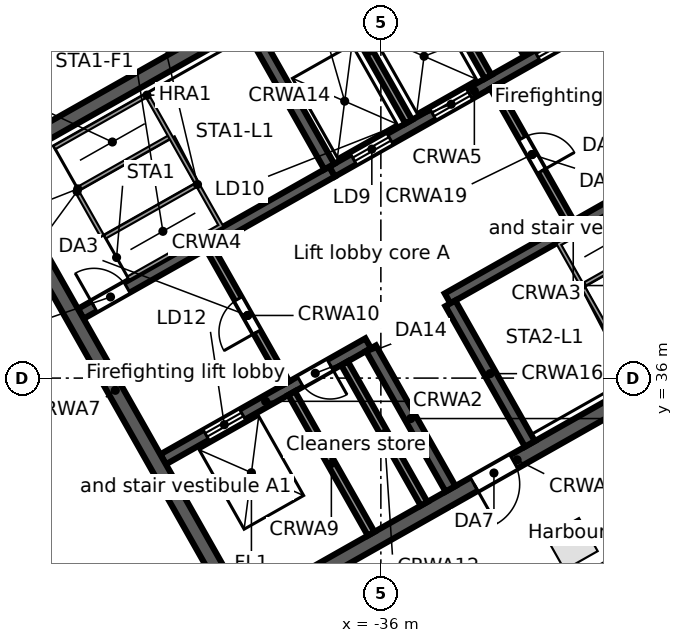
"""IFC4 building model, lengths in metres.
Left out: names, types, materials, properties, quantities, classifications, styles, units other than length and angle.
Written with IfcOpenShell. Run it as: python <this file> out.ifc"""

import sys

from ifc_helpers import new_model, si_unit, direction, frame, frame_2d, origin, origin_2d, place, context, subcontext, project, spatial, rectangle, extrude, element, fill, save


model = new_model("IFC4")
c1 = context("Model", 3, precision=1e-05, world=origin(), true_north=direction((0.0, 1.0)))
c2 = subcontext(c1, "Body", "Model", "MODEL_VIEW")
j1 = project(units=[si_unit("LENGTHUNIT", "METRE"), si_unit("PLANEANGLEUNIT", "RADIAN")], contexts=[c1])
p1 = place(None, origin())
s1 = spatial("IfcSite", under=j1, at=p1, CompositionType="ELEMENT")
p2 = place(p1, origin())
s2 = spatial("IfcBuilding", under=s1, at=p2, CompositionType="ELEMENT")
p3 = place(p2, frame((0.0, 0.0, 335.5)))
s3 = spatial("IfcBuildingStorey", under=s2, at=p3, CompositionType="ELEMENT", Elevation=335.5)
p4 = place(p3, frame((-30.976, 31.635, 0.0), z_axis=(0.0, 0.0, 1.0), x_axis=(0.87035569594, 0.492423560103, 0.0)))
e1 = element("IfcColumn", 1, at=p4, inside=s3, PredefinedType="COLUMN", context=c2, shape_type="SweptSolid", body=[
    extrude(rectangle(XDim=1.0, YDim=1.0, at=origin_2d()), origin(), (0.0, 0.0, 1.0), 3.8),
])
p5 = place(p3, frame((-44.115, 26.507, 0.0), z_axis=(0.0, 0.0, 1.0), x_axis=(-0.857166583633, 0.515039268311, 0.0)))
e2 = element("IfcWall", 2, at=p5, inside=s3, PredefinedType="STANDARD", context=c2, shape_type="SweptSolid", body=[
    extrude(rectangle(XDim=17.106, YDim=0.25, at=frame_2d((8.553, 0.0))), origin(), (0.0, 0.0, 1.0), 3.52),
])
p6 = place(p5, frame((14.417, 0.0, 0.8)))
e3 = element("IfcOpeningElement", 3, at=p6, cuts=e2, PredefinedType="OPENING", context=c2, shape_type="SweptSolid", body=[
    extrude(rectangle(XDim=2.4, YDim=2.2, at=frame_2d((1.2, 1.1))), frame((0.0, 0.135, 0.0), z_axis=(0.0, -1.0, 0.0), x_axis=(1.0, 0.0, 0.0)), (0.0, 0.0, 1.0), 0.27),
])
p7 = place(p5, frame((11.584, 0.0, 0.8)))
e4 = element("IfcOpeningElement", 4, at=p7, cuts=e2, PredefinedType="OPENING", context=c2, shape_type="SweptSolid", body=[
    extrude(rectangle(XDim=2.4, YDim=2.2, at=frame_2d((1.2, 1.1))), frame((0.0, 0.135, 0.0), z_axis=(0.0, -1.0, 0.0), x_axis=(1.0, 0.0, 0.0)), (0.0, 0.0, 1.0), 0.27),
])
p8 = place(p5, frame((8.75, 0.0, 0.8)))
e5 = element("IfcOpeningElement", 5, at=p8, cuts=e2, PredefinedType="OPENING", context=c2, shape_type="SweptSolid", body=[
    extrude(rectangle(XDim=2.4, YDim=2.2, at=frame_2d((1.2, 1.1))), frame((0.0, 0.135, 0.0), z_axis=(0.0, -1.0, 0.0), x_axis=(1.0, 0.0, 0.0)), (0.0, 0.0, 1.0), 0.27),
])
p9 = place(p5, frame((5.917, 0.0, 0.8)))
e6 = element("IfcOpeningElement", 6, at=p9, cuts=e2, PredefinedType="OPENING", context=c2, shape_type="SweptSolid", body=[
    extrude(rectangle(XDim=2.4, YDim=2.2, at=frame_2d((1.2, 1.1))), frame((0.0, 0.135, 0.0), z_axis=(0.0, -1.0, 0.0), x_axis=(1.0, 0.0, 0.0)), (0.0, 0.0, 1.0), 0.27),
])
p10 = place(p5, frame((3.084, 0.0, 0.8)))
e7 = element("IfcOpeningElement", 7, at=p10, cuts=e2, PredefinedType="OPENING", context=c2, shape_type="SweptSolid", body=[
    extrude(rectangle(XDim=2.4, YDim=2.2, at=frame_2d((1.2, 1.1))), frame((0.0, 0.135, 0.0), z_axis=(0.0, -1.0, 0.0), x_axis=(1.0, 0.0, 0.0)), (0.0, 0.0, 1.0), 0.27),
])
p11 = place(p5, frame((0.25, 0.0, 0.8)))
e8 = element("IfcOpeningElement", 8, at=p11, cuts=e2, PredefinedType="OPENING", context=c2, shape_type="SweptSolid", body=[
    extrude(rectangle(XDim=2.4, YDim=2.2, at=frame_2d((1.2, 1.1))), frame((0.0, 0.135, 0.0), z_axis=(0.0, -1.0, 0.0), x_axis=(1.0, 0.0, 0.0)), (0.0, 0.0, 1.0), 0.27),
])
p12 = place(p3, frame((-3.017, 46.293, 0.0), z_axis=(0.0, 0.0, 1.0), x_axis=(-0.870355474887, -0.492423950812, 0.0)))
e9 = element("IfcWall", 9, at=p12, inside=s3, PredefinedType="STANDARD", context=c2, shape_type="SweptSolid", body=[
    extrude(rectangle(XDim=40.34, YDim=0.25, at=frame_2d((20.17, 0.0))), origin(), (0.0, 0.0, 1.0), 3.52),
])
p13 = place(p12, frame((37.428, 0.0, 0.8)))
e10 = element("IfcOpeningElement", 10, at=p13, cuts=e9, PredefinedType="OPENING", context=c2, shape_type="SweptSolid", body=[
    extrude(rectangle(XDim=2.4, YDim=2.2, at=frame_2d((1.2, 1.1))), frame((0.0, 0.135, 0.0), z_axis=(0.0, -1.0, 0.0), x_axis=(1.0, 0.0, 0.0)), (0.0, 0.0, 1.0), 0.27),
])
p14 = place(p12, frame((34.372, 0.0, 0.0)))
e11 = element("IfcOpeningElement", 11, at=p14, cuts=e9, PredefinedType="OPENING", context=c2, shape_type="SweptSolid", body=[
    extrude(rectangle(XDim=1.8, YDim=2.4, at=frame_2d((0.9, 1.2))), frame((0.0, 0.135, 0.0), z_axis=(0.0, -1.0, 0.0), x_axis=(1.0, 0.0, 0.0)), (0.0, 0.0, 1.0), 0.27),
])
p15 = place(p12, frame((30.716, 0.0, 0.8)))
e12 = element("IfcOpeningElement", 12, at=p15, cuts=e9, PredefinedType="OPENING", context=c2, shape_type="SweptSolid", body=[
    extrude(rectangle(XDim=2.4, YDim=2.2, at=frame_2d((1.2, 1.1))), frame((0.0, 0.135, 0.0), z_axis=(0.0, -1.0, 0.0), x_axis=(1.0, 0.0, 0.0)), (0.0, 0.0, 1.0), 0.27),
])
p16 = place(p12, frame((27.36, 0.0, 0.8)))
e13 = element("IfcOpeningElement", 13, at=p16, cuts=e9, PredefinedType="OPENING", context=c2, shape_type="SweptSolid", body=[
    extrude(rectangle(XDim=2.4, YDim=2.2, at=frame_2d((1.2, 1.1))), frame((0.0, 0.135, 0.0), z_axis=(0.0, -1.0, 0.0), x_axis=(1.0, 0.0, 0.0)), (0.0, 0.0, 1.0), 0.27),
])
p17 = place(p12, frame((24.304, 0.0, 0.0)))
e14 = element("IfcOpeningElement", 14, at=p17, cuts=e9, PredefinedType="OPENING", context=c2, shape_type="SweptSolid", body=[
    extrude(rectangle(XDim=1.8, YDim=2.4, at=frame_2d((0.9, 1.2))), frame((0.0, 0.135, 0.0), z_axis=(0.0, -1.0, 0.0), x_axis=(1.0, 0.0, 0.0)), (0.0, 0.0, 1.0), 0.27),
])
p18 = place(p12, frame((20.648, 0.0, 0.8)))
e15 = element("IfcOpeningElement", 15, at=p18, cuts=e9, PredefinedType="OPENING", context=c2, shape_type="SweptSolid", body=[
    extrude(rectangle(XDim=2.4, YDim=2.2, at=frame_2d((1.2, 1.1))), frame((0.0, 0.135, 0.0), z_axis=(0.0, -1.0, 0.0), x_axis=(1.0, 0.0, 0.0)), (0.0, 0.0, 1.0), 0.27),
])
p19 = place(p12, frame((17.292, 0.0, 0.8)))
e16 = element("IfcOpeningElement", 16, at=p19, cuts=e9, PredefinedType="OPENING", context=c2, shape_type="SweptSolid", body=[
    extrude(rectangle(XDim=2.4, YDim=2.2, at=frame_2d((1.2, 1.1))), frame((0.0, 0.135, 0.0), z_axis=(0.0, -1.0, 0.0), x_axis=(1.0, 0.0, 0.0)), (0.0, 0.0, 1.0), 0.27),
])
p20 = place(p12, frame((14.236, 0.0, 0.0)))
e17 = element("IfcOpeningElement", 17, at=p20, cuts=e9, PredefinedType="OPENING", context=c2, shape_type="SweptSolid", body=[
    extrude(rectangle(XDim=1.8, YDim=2.4, at=frame_2d((0.9, 1.2))), frame((0.0, 0.135, 0.0), z_axis=(0.0, -1.0, 0.0), x_axis=(1.0, 0.0, 0.0)), (0.0, 0.0, 1.0), 0.27),
])
p21 = place(p12, frame((10.58, 0.0, 0.8)))
e18 = element("IfcOpeningElement", 18, at=p21, cuts=e9, PredefinedType="OPENING", context=c2, shape_type="SweptSolid", body=[
    extrude(rectangle(XDim=2.4, YDim=2.2, at=frame_2d((1.2, 1.1))), frame((0.0, 0.135, 0.0), z_axis=(0.0, -1.0, 0.0), x_axis=(1.0, 0.0, 0.0)), (0.0, 0.0, 1.0), 0.27),
])
p22 = place(p12, frame((7.224, 0.0, 0.8)))
e19 = element("IfcOpeningElement", 19, at=p22, cuts=e9, PredefinedType="OPENING", context=c2, shape_type="SweptSolid", body=[
    extrude(rectangle(XDim=2.4, YDim=2.2, at=frame_2d((1.2, 1.1))), frame((0.0, 0.135, 0.0), z_axis=(0.0, -1.0, 0.0), x_axis=(1.0, 0.0, 0.0)), (0.0, 0.0, 1.0), 0.27),
])
p23 = place(p12, frame((4.168, 0.0, 0.0)))
e20 = element("IfcOpeningElement", 20, at=p23, cuts=e9, PredefinedType="OPENING", context=c2, shape_type="SweptSolid", body=[
    extrude(rectangle(XDim=1.8, YDim=2.4, at=frame_2d((0.9, 1.2))), frame((0.0, 0.135, 0.0), z_axis=(0.0, -1.0, 0.0), x_axis=(1.0, 0.0, 0.0)), (0.0, 0.0, 1.0), 0.27),
])
p24 = place(p12, frame((0.512, 0.0, 0.8)))
e21 = element("IfcOpeningElement", 21, at=p24, cuts=e9, PredefinedType="OPENING", context=c2, shape_type="SweptSolid", body=[
    extrude(rectangle(XDim=2.4, YDim=2.2, at=frame_2d((1.2, 1.1))), frame((0.0, 0.135, 0.0), z_axis=(0.0, -1.0, 0.0), x_axis=(1.0, 0.0, 0.0)), (0.0, 0.0, 1.0), 0.27),
])
p25 = place(p3, frame((-39.813, 29.662, 0.0), z_axis=(0.0, 0.0, 1.0), x_axis=(0.870350116061, 0.492433422375, 0.0)))
e22 = element("IfcWall", 22, at=p25, inside=s3, PredefinedType="SOLIDWALL", context=c2, shape_type="SweptSolid", body=[
    extrude(rectangle(XDim=17.0, YDim=0.4, at=frame_2d((8.5, 0.0))), origin(), (0.0, 0.0, 1.0), 3.52),
])
p26 = place(p25, frame((7.2, 0.0, 0.0)))
e23 = element("IfcOpeningElement", 23, at=p26, cuts=e22, PredefinedType="OPENING", context=c2, shape_type="SweptSolid", body=[
    extrude(rectangle(XDim=1.2, YDim=2.1, at=frame_2d((0.6, 1.05))), frame((0.0, 0.21, 0.0), z_axis=(0.0, -1.0, 0.0), x_axis=(1.0, 0.0, 0.0)), (0.0, 0.0, 1.0), 0.42),
])
p27 = place(p3, frame((-41.73, 33.863, 0.0), z_axis=(0.0, 0.0, 1.0), x_axis=(0.870350800578, 0.492432212525, 0.0)))
e24 = element("IfcWall", 24, at=p27, inside=s3, PredefinedType="SOLIDWALL", context=c2, shape_type="SweptSolid", body=[
    extrude(rectangle(XDim=6.2, YDim=0.3, at=frame_2d((3.1, 0.0))), origin(), (0.0, 0.0, 1.0), 3.52),
])
p28 = place(p27, frame((1.3, 0.0, 0.0)))
e25 = element("IfcOpeningElement", 25, at=p28, cuts=e24, PredefinedType="OPENING", context=c2, shape_type="SweptSolid", body=[
    extrude(rectangle(XDim=1.1, YDim=2.1, at=frame_2d((0.55, 1.05))), frame((0.0, 0.16, 0.0), z_axis=(0.0, -1.0, 0.0), x_axis=(1.0, 0.0, 0.0)), (0.0, 0.0, 1.0), 0.32),
])
p29 = place(p27, frame((4.15, 0.0, 0.0)))
e26 = element("IfcOpeningElement", 26, at=p29, cuts=e24, PredefinedType="OPENING", context=c2, shape_type="SweptSolid", body=[
    extrude(rectangle(XDim=0.9, YDim=2.1, at=frame_2d((0.45, 1.05))), frame((0.0, 0.16, 0.0), z_axis=(0.0, -1.0, 0.0), x_axis=(1.0, 0.0, 0.0)), (0.0, 0.0, 1.0), 0.32),
])
p30 = place(p3, frame((-34.245, 38.097, 0.0), z_axis=(0.0, 0.0, 1.0), x_axis=(0.870356351998, 0.492422400523, 0.0)))
e27 = element("IfcWall", 27, at=p30, inside=s3, PredefinedType="SOLIDWALL", context=c2, shape_type="SweptSolid", body=[
    extrude(rectangle(XDim=7.6, YDim=0.3, at=frame_2d((3.8, 0.0))), origin(), (0.0, 0.0, 1.0), 3.52),
])
p31 = place(p30, frame((6.2, 0.0, 0.0)))
e28 = element("IfcOpeningElement", 28, at=p31, cuts=e27, PredefinedType="OPENING", context=c2, shape_type="SweptSolid", body=[
    extrude(rectangle(XDim=1.0, YDim=2.1, at=frame_2d((0.5, 1.05))), frame((0.0, 0.16, 0.0), z_axis=(0.0, -1.0, 0.0), x_axis=(1.0, 0.0, 0.0)), (0.0, 0.0, 1.0), 0.32),
])
p32 = place(p3, frame((-43.897, 37.692, 0.0), z_axis=(0.0, 0.0, 1.0), x_axis=(0.870356351998, 0.492422400523, 0.0)))
e29 = element("IfcWall", 29, at=p32, inside=s3, PredefinedType="SOLIDWALL", context=c2, shape_type="SweptSolid", body=[
    extrude(rectangle(XDim=7.6, YDim=0.3, at=frame_2d((3.8, 0.0))), origin(), (0.0, 0.0, 1.0), 3.52),
])
p33 = place(p32, frame((0.4, 0.0, 0.0)))
e30 = element("IfcOpeningElement", 30, at=p33, cuts=e29, PredefinedType="OPENING", context=c2, shape_type="SweptSolid", body=[
    extrude(rectangle(XDim=1.0, YDim=2.1, at=frame_2d((0.5, 1.05))), frame((0.0, 0.16, 0.0), z_axis=(0.0, -1.0, 0.0), x_axis=(1.0, 0.0, 0.0)), (0.0, 0.0, 1.0), 0.32),
])
p34 = place(p3, frame((-37.282, 41.435, 0.0), z_axis=(0.0, 0.0, 1.0), x_axis=(0.870361315115, 0.492413628113, 0.0)))
e31 = element("IfcWall", 31, at=p34, inside=s3, PredefinedType="SOLIDWALL", context=c2, shape_type="SweptSolid", body=[
    extrude(rectangle(XDim=8.6, YDim=0.3, at=frame_2d((4.3, 0.0))), origin(), (0.0, 0.0, 1.0), 3.52),
])
p35 = place(p34, frame((0.65, 0.0, 0.0)))
e32 = element("IfcOpeningElement", 32, at=p35, cuts=e31, PredefinedType="OPENING", context=c2, shape_type="SweptSolid", body=[
    extrude(rectangle(XDim=1.1, YDim=2.1, at=frame_2d((0.55, 1.05))), frame((0.0, 0.16, 0.0), z_axis=(0.0, -1.0, 0.0), x_axis=(1.0, 0.0, 0.0)), (0.0, 0.0, 1.0), 0.32),
])
p36 = place(p34, frame((3.05, 0.0, 0.0)))
e33 = element("IfcOpeningElement", 33, at=p36, cuts=e31, PredefinedType="OPENING", context=c2, shape_type="SweptSolid", body=[
    extrude(rectangle(XDim=1.1, YDim=2.1, at=frame_2d((0.55, 1.05))), frame((0.0, 0.16, 0.0), z_axis=(0.0, -1.0, 0.0), x_axis=(1.0, 0.0, 0.0)), (0.0, 0.0, 1.0), 0.32),
])
p37 = place(p34, frame((6.2, 0.0, 0.0)))
e34 = element("IfcOpeningElement", 34, at=p37, cuts=e31, PredefinedType="OPENING", context=c2, shape_type="SweptSolid", body=[
    extrude(rectangle(XDim=1.1, YDim=2.1, at=frame_2d((0.55, 1.05))), frame((0.0, 0.16, 0.0), z_axis=(0.0, -1.0, 0.0), x_axis=(1.0, 0.0, 0.0)), (0.0, 0.0, 1.0), 0.32),
])
p38 = place(p3, frame((-46.51, 41.499, 0.0), z_axis=(0.0, 0.0, 1.0), x_axis=(0.870356271124, 0.492422543467, 0.0)))
e35 = element("IfcWall", 35, at=p38, inside=s3, PredefinedType="SOLIDWALL", context=c2, shape_type="SweptSolid", body=[
    extrude(rectangle(XDim=17.0, YDim=0.4, at=frame_2d((8.5, 0.0))), origin(), (0.0, 0.0, 1.0), 3.52),
])
p39 = place(p3, frame((-46.238, 41.423, 0.0), z_axis=(0.0, 0.0, 1.0), x_axis=(0.492421663121, -0.870356769198, 0.0)))
e36 = element("IfcWall", 36, at=p39, inside=s3, PredefinedType="SOLIDWALL", context=c2, shape_type="SweptSolid", body=[
    extrude(rectangle(XDim=13.2, YDim=0.4, at=frame_2d((6.6, 0.0))), origin(), (0.0, 0.0, 1.0), 3.52),
])
p40 = place(p3, frame((-38.349, 35.603, 0.0), z_axis=(0.0, 0.0, 1.0), x_axis=(0.492397924348, -0.870370199454, 0.0)))
e37 = element("IfcWall", 37, at=p40, inside=s3, PredefinedType="SOLIDWALL", context=c2, shape_type="SweptSolid", body=[
    extrude(rectangle(XDim=4.25, YDim=0.2, at=frame_2d((2.125, 0.0))), origin(), (0.0, 0.0, 1.0), 3.52),
])
p41 = place(p3, frame((-40.516, 39.433, 0.0), z_axis=(0.0, 0.0, 1.0), x_axis=(0.492453559952, -0.87033872216, 0.0)))
e38 = element("IfcWall", 38, at=p41, inside=s3, PredefinedType="PARTITIONING", context=c2, shape_type="SweptSolid", body=[
    extrude(rectangle(XDim=4.1, YDim=0.2, at=frame_2d((2.05, 0.0))), origin(), (0.0, 0.0, 1.0), 3.52),
])
p42 = place(p41, frame((1.55, 0.0, 0.0)))
e39 = element("IfcOpeningElement", 39, at=p42, cuts=e38, PredefinedType="OPENING", context=c2, shape_type="SweptSolid", body=[
    extrude(rectangle(XDim=1.0, YDim=2.1, at=frame_2d((0.5, 1.05))), frame((0.0, 0.11, 0.0), z_axis=(0.0, -1.0, 0.0), x_axis=(1.0, 0.0, 0.0)), (0.0, 0.0, 1.0), 0.22),
])
p43 = place(p3, frame((-36.956, 36.391, 0.0), z_axis=(0.0, 0.0, 1.0), x_axis=(0.492397924348, -0.870370199454, 0.0)))
e40 = element("IfcWall", 40, at=p43, inside=s3, PredefinedType="SOLIDWALL", context=c2, shape_type="SweptSolid", body=[
    extrude(rectangle(XDim=4.25, YDim=0.2, at=frame_2d((2.125, 0.0))), origin(), (0.0, 0.0, 1.0), 3.52),
])
for number, where, z_axis, x_axis in (
    (41, (-36.26, 36.785, 0.0), (0.0, 0.0, 1.0), (0.492, -0.87, 0.0)),
    (42, (-39.449, 45.264, 0.0), (0.0, 0.0, 1.0), (0.492, -0.87, 0.0)),
    (43, (-34.171, 37.967, 0.0), (0.0, 0.0, 1.0), (0.492, -0.87, 0.0)),
):
    element("IfcWall", number, at=place(p3, frame(where, z_axis=z_axis, x_axis=x_axis)), inside=s3, PredefinedType="SOLIDWALL", context=c2, shape_type="SweptSolid", body=[
        extrude(rectangle(XDim=4.25, YDim=0.3, at=frame_2d((2.125, 0.0))), origin(), (0.0, 0.0, 1.0), 3.52),
    ])
p44 = place(p3, frame((-37.36, 46.446, 0.0), z_axis=(0.0, 0.0, 1.0), x_axis=(0.492422543467, -0.870356271124, 0.0)))
e44 = element("IfcWall", 44, at=p44, inside=s3, PredefinedType="SOLIDWALL", context=c2, shape_type="SweptSolid", body=[
    extrude(rectangle(XDim=4.25, YDim=0.2, at=frame_2d((2.125, 0.0))), origin(), (0.0, 0.0, 1.0), 3.52),
])
p45 = place(p3, frame((-33.031, 43.667, 0.0), z_axis=(0.0, 0.0, 1.0), x_axis=(0.492408451753, -0.87036424366, 0.0)))
e45 = element("IfcWall", 45, at=p45, inside=s3, PredefinedType="PARTITIONING", context=c2, shape_type="SweptSolid", body=[
    extrude(rectangle(XDim=4.1, YDim=0.2, at=frame_2d((2.05, 0.0))), origin(), (0.0, 0.0, 1.0), 3.52),
])
p46 = place(p45, frame((1.55, 0.0, 0.0)))
e46 = element("IfcOpeningElement", 46, at=p46, cuts=e45, PredefinedType="OPENING", context=c2, shape_type="SweptSolid", body=[
    extrude(rectangle(XDim=1.0, YDim=2.1, at=frame_2d((0.5, 1.05))), frame((0.0, 0.11, 0.0), z_axis=(0.0, -1.0, 0.0), x_axis=(1.0, 0.0, 0.0)), (0.0, 0.0, 1.0), 0.22),
])
p47 = place(p3, frame((-35.271, 47.628, 0.0), z_axis=(0.0, 0.0, 1.0), x_axis=(0.492422543467, -0.870356271124, 0.0)))
e47 = element("IfcWall", 47, at=p47, inside=s3, PredefinedType="SOLIDWALL", context=c2, shape_type="SweptSolid", body=[
    extrude(rectangle(XDim=4.25, YDim=0.2, at=frame_2d((2.125, 0.0))), origin(), (0.0, 0.0, 1.0), 3.52),
])
p48 = place(p3, frame((-31.79, 49.597, 0.0), z_axis=(0.0, 0.0, 1.0), x_axis=(0.492421663121, -0.870356769198, 0.0)))
e48 = element("IfcWall", 48, at=p48, inside=s3, PredefinedType="SOLIDWALL", context=c2, shape_type="SweptSolid", body=[
    extrude(rectangle(XDim=13.2, YDim=0.4, at=frame_2d((6.6, 0.0))), origin(), (0.0, 0.0, 1.0), 3.52),
])
p49 = place(p15, origin())
e49 = element("IfcWindow", 49, at=p49, inside=s3, PartitioningType="SINGLE_PANEL", PredefinedType="WINDOW", context=c2, shape_type="SweptSolid", body=[
    extrude(rectangle(XDim=2.4, YDim=2.2, at=frame_2d((1.2, 1.1))), frame((0.0, 0.03, 0.0), z_axis=(0.0, -1.0, 0.0), x_axis=(1.0, 0.0, 0.0)), (0.0, 0.0, 1.0), 0.06),
])
fill(e12, e49)
p50 = place(p35, origin())
e50 = element("IfcDoor", 50, at=p50, inside=s3, OperationType="DOUBLE_DOOR_SLIDING", PredefinedType="DOOR", context=c2, shape_type="SweptSolid", body=[
    extrude(rectangle(XDim=1.1, YDim=2.1, at=frame_2d((0.55, 1.05))), frame((0.0, 0.025, 0.0), z_axis=(0.0, -1.0, 0.0), x_axis=(1.0, 0.0, 0.0)), (0.0, 0.0, 1.0), 0.05),
])
fill(e32, e50)
p51 = place(p36, origin())
e51 = element("IfcDoor", 51, at=p51, inside=s3, OperationType="DOUBLE_DOOR_SLIDING", PredefinedType="DOOR", context=c2, shape_type="SweptSolid", body=[
    extrude(rectangle(XDim=1.1, YDim=2.1, at=frame_2d((0.55, 1.05))), frame((0.0, 0.025, 0.0), z_axis=(0.0, -1.0, 0.0), x_axis=(1.0, 0.0, 0.0)), (0.0, 0.0, 1.0), 0.05),
])
fill(e33, e51)
p52 = place(p37, origin())
e52 = element("IfcDoor", 52, at=p52, inside=s3, OperationType="DOUBLE_DOOR_SLIDING", PredefinedType="DOOR", context=c2, shape_type="SweptSolid", body=[
    extrude(rectangle(XDim=1.1, YDim=2.1, at=frame_2d((0.55, 1.05))), frame((0.0, 0.025, 0.0), z_axis=(0.0, -1.0, 0.0), x_axis=(1.0, 0.0, 0.0)), (0.0, 0.0, 1.0), 0.05),
])
fill(e34, e52)
p53 = place(p28, origin())
e53 = element("IfcDoor", 53, at=p53, inside=s3, OperationType="DOUBLE_DOOR_SLIDING", PredefinedType="DOOR", context=c2, shape_type="SweptSolid", body=[
    extrude(rectangle(XDim=1.1, YDim=2.1, at=frame_2d((0.55, 1.05))), frame((0.0, 0.025, 0.0), z_axis=(0.0, -1.0, 0.0), x_axis=(1.0, 0.0, 0.0)), (0.0, 0.0, 1.0), 0.05),
])
fill(e25, e53)
p54 = place(p33, origin())
e54 = element("IfcDoor", 54, at=p54, inside=s3, OperationType="SINGLE_SWING_LEFT", PredefinedType="DOOR", context=c2, shape_type="SweptSolid", body=[
    extrude(rectangle(XDim=1.0, YDim=2.1, at=frame_2d((0.5, 1.05))), frame((0.0, 0.025, 0.0), z_axis=(0.0, -1.0, 0.0), x_axis=(1.0, 0.0, 0.0)), (0.0, 0.0, 1.0), 0.05),
])
fill(e30, e54)
p55 = place(p42, frame((1.0, 0.0, 0.0), z_axis=(0.0, 0.0, 1.0), x_axis=(-1.0, 0.0, 0.0)))
e55 = element("IfcDoor", 55, at=p55, inside=s3, OperationType="SINGLE_SWING_LEFT", PredefinedType="DOOR", context=c2, shape_type="SweptSolid", body=[
    extrude(rectangle(XDim=1.0, YDim=2.1, at=frame_2d((0.5, 1.05))), frame((0.0, 0.025, 0.0), z_axis=(0.0, -1.0, 0.0), x_axis=(1.0, 0.0, 0.0)), (0.0, 0.0, 1.0), 0.05),
])
fill(e39, e55)
p56 = place(p46, origin())
e56 = element("IfcDoor", 56, at=p56, inside=s3, OperationType="SINGLE_SWING_RIGHT", PredefinedType="DOOR", context=c2, shape_type="SweptSolid", body=[
    extrude(rectangle(XDim=1.0, YDim=2.1, at=frame_2d((0.5, 1.05))), frame((0.0, 0.025, 0.0), z_axis=(0.0, -1.0, 0.0), x_axis=(1.0, 0.0, 0.0)), (0.0, 0.0, 1.0), 0.05),
])
fill(e46, e56)
p57 = place(p26, frame((1.2, 0.0, 0.0), z_axis=(0.0, 0.0, 1.0), x_axis=(-1.0, 0.0, 0.0)))
e57 = element("IfcDoor", 57, at=p57, inside=s3, OperationType="SINGLE_SWING_RIGHT", PredefinedType="DOOR", context=c2, shape_type="SweptSolid", body=[
    extrude(rectangle(XDim=1.2, YDim=2.1, at=frame_2d((0.6, 1.05))), frame((0.0, 0.025, 0.0), z_axis=(0.0, -1.0, 0.0), x_axis=(1.0, 0.0, 0.0)), (0.0, 0.0, 1.0), 0.05),
])
fill(e23, e57)
p58 = place(p29, frame((0.9, 0.0, 0.0), z_axis=(0.0, 0.0, 1.0), x_axis=(-1.0, 0.0, 0.0)))
e58 = element("IfcDoor", 58, at=p58, inside=s3, OperationType="SINGLE_SWING_LEFT", PredefinedType="DOOR", context=c2, shape_type="SweptSolid", body=[
    extrude(rectangle(XDim=0.9, YDim=2.1, at=frame_2d((0.45, 1.05))), frame((0.0, 0.025, 0.0), z_axis=(0.0, -1.0, 0.0), x_axis=(1.0, 0.0, 0.0)), (0.0, 0.0, 1.0), 0.05),
])
fill(e26, e58)
save(model, sys.argv[1])
